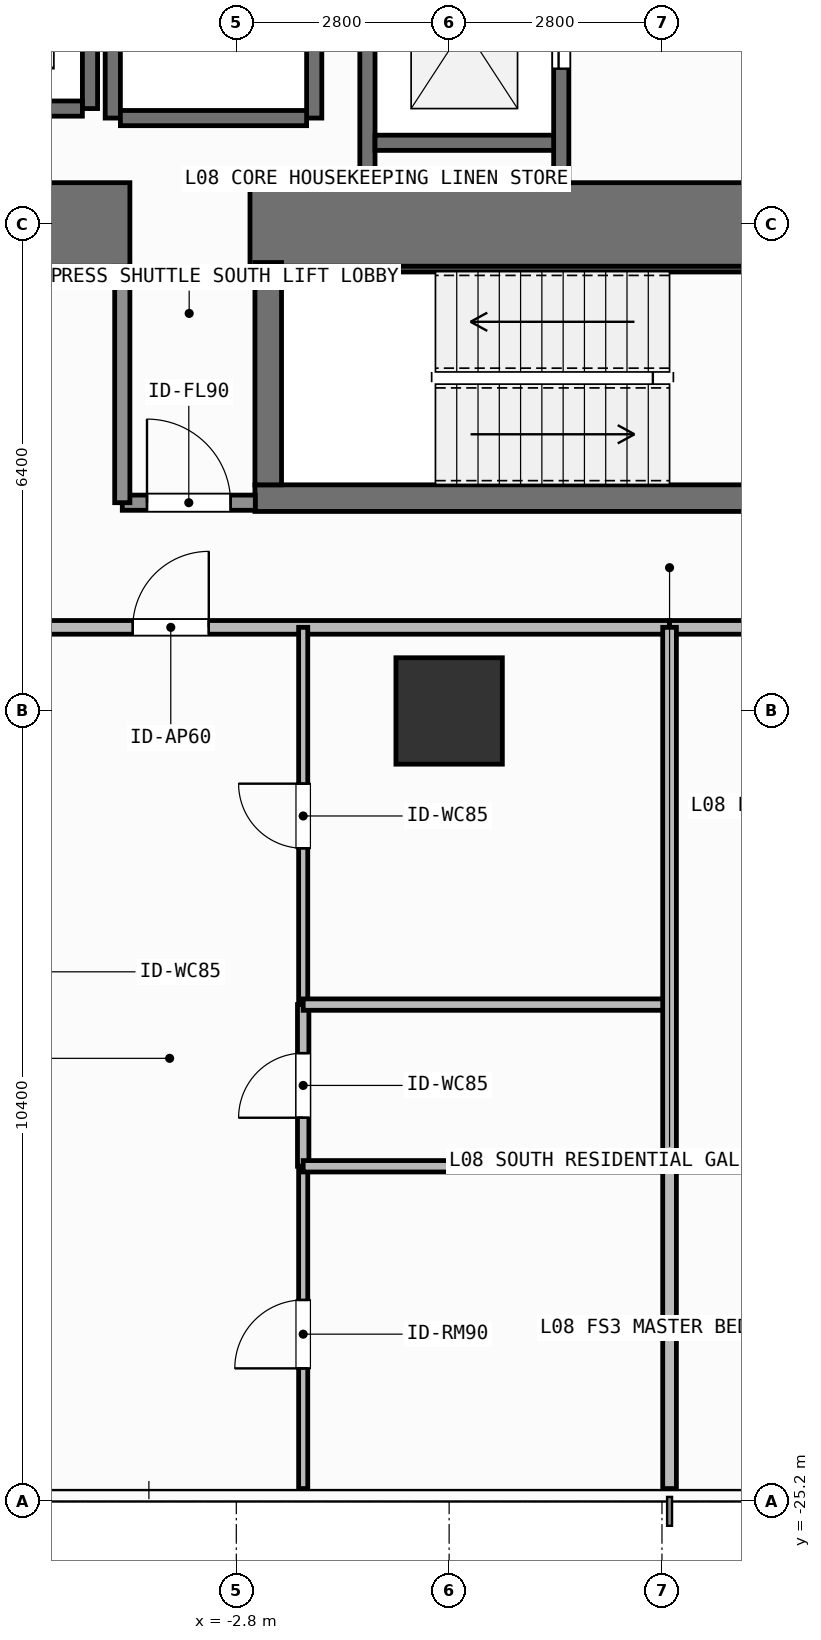
"""IFC4 building model, lengths in metres.
Left out: names, types, materials, properties, quantities, classifications, styles, units other than length and angle.
Written with IfcOpenShell. Run it as: python <this file> out.ifc"""

import sys

from ifc_helpers import new_model, si_unit, direction, frame, frame_2d, origin, origin_2d, place, context, subcontext, project, spatial, rectangle, extrude, element, fill, save


model = new_model("IFC4")
c1 = context("Model", 3, precision=1e-05, world=origin(), true_north=direction((0.0, 1.0)))
c2 = subcontext(c1, "Body", "Model", "MODEL_VIEW")
j1 = project(units=[si_unit("LENGTHUNIT", "METRE"), si_unit("PLANEANGLEUNIT", "RADIAN")], contexts=[c1])
p1 = place(None, origin())
s1 = spatial("IfcSite", under=j1, at=p1, CompositionType="ELEMENT")
p2 = place(p1, origin())
s2 = spatial("IfcBuilding", under=s1, at=p2, CompositionType="ELEMENT")
p3 = place(p2, frame((0.0, 0.0, 30.6)))
s3 = spatial("IfcBuildingStorey", under=s2, at=p3, CompositionType="ELEMENT", Elevation=30.6)
p4 = place(p3, frame((-7.55, -8.4, 0.0), z_axis=(0.0, 0.0, 1.0), x_axis=(1.0, 0.0, 0.0)))
e1 = element("IfcWall", 1, at=p4, inside=s3, PredefinedType="SHEAR", context=c2, shape_type="SweptSolid", body=[
    extrude(rectangle(XDim=3.35, YDim=1.1, at=frame_2d((1.675, 0.0))), origin(), (0.0, 0.0, 1.0), 3.9),
])
p5 = place(p3, frame((-2.62, -8.4, 0.0), z_axis=(0.0, 0.0, 1.0), x_axis=(1.0, 0.0, 0.0)))
e2 = element("IfcWall", 2, at=p5, inside=s3, PredefinedType="SHEAR", context=c2, shape_type="SweptSolid", body=[
    extrude(rectangle(XDim=7.27, YDim=1.1, at=frame_2d((3.635, 0.0))), origin(), (0.0, 0.0, 1.0), 3.9),
])
p6 = place(p3, frame((-2.555, -12.0, 0.0), z_axis=(0.0, 0.0, 1.0), x_axis=(1.0, 0.0, 0.0)))
e3 = element("IfcWall", 3, at=p6, inside=s3, PredefinedType="SHEAR", context=c2, shape_type="SweptSolid", body=[
    extrude(rectangle(XDim=7.31, YDim=0.35, at=frame_2d((3.655, 0.0))), origin(), (0.0, 0.0, 1.0), 3.9),
])
p7 = place(p3, frame((-2.2, -8.988, 0.0), z_axis=(0.0, 0.0, 1.0), x_axis=(1.0, 0.0, 0.0)))
e4 = element("IfcWall", 4, at=p7, inside=s3, PredefinedType="SHEAR", context=c2, shape_type="SweptSolid", body=[
    extrude(rectangle(XDim=6.6, YDim=0.075, at=frame_2d((3.3, 0.0))), origin(), (0.0, 0.0, 1.0), 3.9),
])
p8 = place(p3, frame((-2.38, -11.825, 0.0), z_axis=(0.0, 0.0, 1.0), x_axis=(0.0, 1.0, 0.0)))
e5 = element("IfcWall", 5, at=p8, inside=s3, PredefinedType="SHEAR", context=c2, shape_type="SweptSolid", body=[
    extrude(rectangle(XDim=2.925, YDim=0.35, at=frame_2d((1.462, 0.0))), origin(), (0.0, 0.0, 1.0), 3.9),
])
p9 = place(p3, frame((0.0, -14.8, 0.0), z_axis=(0.0, 0.0, 1.0), x_axis=(1.0, 0.0, 0.0)))
e6 = element("IfcColumn", 6, at=p9, inside=s3, PredefinedType="COLUMN", context=c2, shape_type="SweptSolid", body=[
    extrude(rectangle(XDim=1.4, YDim=1.4, at=origin_2d()), origin(), (0.0, 0.0, 1.0), 3.9),
])
p10 = place(p3, frame((-4.725, -6.875, 0.0), z_axis=(0.0, 0.0, 1.0), x_axis=(0.0, 1.0, 0.0)))
e7 = element("IfcWall", 7, at=p10, inside=s3, PredefinedType="SHEAR", context=c2, shape_type="SweptSolid", body=[
    extrude(rectangle(XDim=2.55, YDim=0.2, at=frame_2d((1.275, 0.0))), origin(), (0.0, 0.0, 1.0), 3.68),
])
p11 = place(p3, frame((-7.175, -6.875, 0.0), z_axis=(0.0, 0.0, 1.0), x_axis=(1.0, 0.0, 0.0)))
e8 = element("IfcWall", 8, at=p11, inside=s3, PredefinedType="SHEAR", context=c2, shape_type="SweptSolid", body=[
    extrude(rectangle(XDim=2.35, YDim=0.2, at=frame_2d((1.175, 0.0))), origin(), (0.0, 0.0, 1.0), 3.68),
])
for number, where, z_axis, x_axis in (
    (9, (-4.425, -7.0, 0.0), (0.0, 0.0, 1.0), (0.0, 1.0, 0.0)),
    (10, (-1.775, -7.0, 0.0), (0.0, 0.0, 1.0), (0.0, 1.0, 0.0)),
):
    element("IfcWall", number, at=place(p3, frame(where, z_axis=z_axis, x_axis=x_axis)), inside=s3, PredefinedType="SHEAR", context=c2, shape_type="SweptSolid", body=[
        extrude(rectangle(XDim=2.8, YDim=0.2, at=frame_2d((1.4, 0.0))), origin(), (0.0, 0.0, 1.0), 3.68),
    ])
p12 = place(p3, frame((-4.325, -7.0, 0.0), z_axis=(0.0, 0.0, 1.0), x_axis=(1.0, 0.0, 0.0)))
e11 = element("IfcWall", 11, at=p12, inside=s3, PredefinedType="SHEAR", context=c2, shape_type="SweptSolid", body=[
    extrude(rectangle(XDim=2.45, YDim=0.2, at=frame_2d((1.225, 0.0))), origin(), (0.0, 0.0, 1.0), 3.68),
])
p13 = place(p3, frame((-1.075, -7.85, 0.0), z_axis=(0.0, 0.0, 1.0), x_axis=(0.0, 1.0, 0.0)))
e12 = element("IfcWall", 12, at=p13, inside=s3, PredefinedType="SHEAR", context=c2, shape_type="SweptSolid", body=[
    extrude(rectangle(XDim=3.575, YDim=0.2, at=frame_2d((1.788, 0.0))), origin(), (0.0, 0.0, 1.0), 3.68),
])
p14 = place(p3, frame((1.475, -7.85, 0.0), z_axis=(0.0, 0.0, 1.0), x_axis=(0.0, 1.0, 0.0)))
e13 = element("IfcWall", 13, at=p14, inside=s3, PredefinedType="SHEAR", context=c2, shape_type="SweptSolid", body=[
    extrude(rectangle(XDim=3.575, YDim=0.2, at=frame_2d((1.788, 0.0))), origin(), (0.0, 0.0, 1.0), 3.68),
])
p15 = place(p14, frame((1.5, 0.0, 0.0)))
e14 = element("IfcOpeningElement", 14, at=p15, cuts=e13, PredefinedType="OPENING", context=c2, shape_type="SweptSolid", body=[
    extrude(rectangle(XDim=1.1, YDim=2.2, at=frame_2d((0.55, 1.1))), frame((0.0, 0.11, 0.0), z_axis=(0.0, -1.0, 0.0), x_axis=(1.0, 0.0, 0.0)), (0.0, 0.0, 1.0), 0.22),
])
p16 = place(p3, frame((-0.975, -7.325, 0.0), z_axis=(0.0, 0.0, 1.0), x_axis=(1.0, 0.0, 0.0)))
e15 = element("IfcWall", 15, at=p16, inside=s3, PredefinedType="SHEAR", context=c2, shape_type="SweptSolid", body=[
    extrude(rectangle(XDim=2.35, YDim=0.2, at=frame_2d((1.175, 0.0))), origin(), (0.0, 0.0, 1.0), 3.68),
])
p17 = place(p3, frame((-4.3, -12.06, 0.0), z_axis=(0.0, 0.0, 1.0), x_axis=(1.0, 0.0, 0.0)))
e16 = element("IfcWall", 16, at=p17, inside=s3, PredefinedType="SOLIDWALL", context=c2, shape_type="SweptSolid", body=[
    extrude(rectangle(XDim=1.75, YDim=0.2, at=frame_2d((0.875, 0.0))), origin(), (0.0, 0.0, 1.0), 3.68),
])
p18 = place(p17, frame((0.325, 0.0, 0.0)))
e17 = element("IfcOpeningElement", 17, at=p18, cuts=e16, PredefinedType="OPENING", context=c2, shape_type="SweptSolid", body=[
    extrude(rectangle(XDim=1.1, YDim=2.15, at=frame_2d((0.55, 1.075))), frame((0.0, 0.11, 0.0), z_axis=(0.0, -1.0, 0.0), x_axis=(1.0, 0.0, 0.0)), (0.0, 0.0, 1.0), 0.22),
])
p19 = place(p3, frame((-9.151, -13.7, 0.0), z_axis=(0.0, 0.0, 1.0), x_axis=(1.0, 0.0, 0.0)))
e18 = element("IfcWall", 18, at=p19, inside=s3, PredefinedType="PARTITIONING", context=c2, shape_type="SweptSolid", body=[
    extrude(rectangle(XDim=12.051, YDim=0.18, at=frame_2d((6.025, 0.0))), origin(), (0.0, 0.0, 1.0), 3.68),
])
p20 = place(p19, frame((4.989, 0.0, 0.0)))
e19 = element("IfcOpeningElement", 19, at=p20, cuts=e18, PredefinedType="OPENING", context=c2, shape_type="SweptSolid", body=[
    extrude(rectangle(XDim=1.0, YDim=2.2, at=frame_2d((0.5, 1.1))), frame((0.0, 0.1, 0.0), z_axis=(0.0, -1.0, 0.0), x_axis=(1.0, 0.0, 0.0)), (0.0, 0.0, 1.0), 0.2),
])
p21 = place(p3, frame((-1.92, -20.79, 0.0), z_axis=(0.0, 0.0, 1.0), x_axis=(0.0, 1.0, 0.0)))
e20 = element("IfcWall", 20, at=p21, inside=s3, PredefinedType="PARTITIONING", context=c2, shape_type="SweptSolid", body=[
    extrude(rectangle(XDim=2.127, YDim=0.15, at=frame_2d((1.063, 0.0))), origin(), (0.0, 0.0, 1.0), 3.68),
])
p22 = place(p21, frame((0.638, 0.0, 0.0)))
e21 = element("IfcOpeningElement", 21, at=p22, cuts=e20, PredefinedType="OPENING", context=c2, shape_type="SweptSolid", body=[
    extrude(rectangle(XDim=0.85, YDim=2.1, at=frame_2d((0.425, 1.05))), frame((0.0, 0.085, 0.0), z_axis=(0.0, -1.0, 0.0), x_axis=(1.0, 0.0, 0.0)), (0.0, 0.0, 1.0), 0.17),
])
p23 = place(p3, frame((-1.92, -18.663, 0.0), z_axis=(0.0, 0.0, 1.0), x_axis=(0.0, 1.0, 0.0)))
e22 = element("IfcWall", 22, at=p23, inside=s3, PredefinedType="PARTITIONING", context=c2, shape_type="SweptSolid", body=[
    extrude(rectangle(XDim=4.963, YDim=0.12, at=frame_2d((2.481, 0.0))), origin(), (0.0, 0.0, 1.0), 3.68),
])
p24 = place(p23, frame((2.056, 0.0, 0.0)))
e23 = element("IfcOpeningElement", 23, at=p24, cuts=e22, PredefinedType="OPENING", context=c2, shape_type="SweptSolid", body=[
    extrude(rectangle(XDim=0.85, YDim=2.1, at=frame_2d((0.425, 1.05))), frame((0.0, 0.07, 0.0), z_axis=(0.0, -1.0, 0.0), x_axis=(1.0, 0.0, 0.0)), (0.0, 0.0, 1.0), 0.14),
])
p25 = place(p3, frame((-1.92, -25.03, 0.0), z_axis=(0.0, 0.0, 1.0), x_axis=(0.0, 1.0, 0.0)))
e24 = element("IfcWall", 24, at=p25, inside=s3, PredefinedType="PARTITIONING", context=c2, shape_type="SweptSolid", body=[
    extrude(rectangle(XDim=4.24, YDim=0.12, at=frame_2d((2.12, 0.0))), origin(), (0.0, 0.0, 1.0), 3.68),
])
p26 = place(p25, frame((1.581, 0.0, 0.0)))
e25 = element("IfcOpeningElement", 25, at=p26, cuts=e24, PredefinedType="OPENING", context=c2, shape_type="SweptSolid", body=[
    extrude(rectangle(XDim=0.9, YDim=2.1, at=frame_2d((0.45, 1.05))), frame((0.0, 0.07, 0.0), z_axis=(0.0, -1.0, 0.0), x_axis=(1.0, 0.0, 0.0)), (0.0, 0.0, 1.0), 0.14),
])
p27 = place(p3, frame((2.9, -13.7, 0.0), z_axis=(0.0, 0.0, 1.0), x_axis=(1.0, 0.0, 0.0)))
e26 = element("IfcWall", 26, at=p27, inside=s3, PredefinedType="PARTITIONING", context=c2, shape_type="SweptSolid", body=[
    extrude(rectangle(XDim=11.922, YDim=0.18, at=frame_2d((5.961, 0.0))), origin(), (0.0, 0.0, 1.0), 3.68),
])
p28 = place(p27, frame((5.371, 0.0, 0.0)))
e27 = element("IfcOpeningElement", 27, at=p28, cuts=e26, PredefinedType="OPENING", context=c2, shape_type="SweptSolid", body=[
    extrude(rectangle(XDim=1.0, YDim=2.2, at=frame_2d((0.5, 1.1))), frame((0.0, 0.1, 0.0), z_axis=(0.0, -1.0, 0.0), x_axis=(1.0, 0.0, 0.0)), (0.0, 0.0, 1.0), 0.2),
])
p29 = place(p3, frame((-4.3, -12.06, 0.0), z_axis=(0.0, 0.0, 1.0), x_axis=(0.0, 1.0, 0.0)))
e28 = element("IfcWall", 28, at=p29, inside=s3, PredefinedType="SOLIDWALL", context=c2, shape_type="SweptSolid", body=[
    extrude(rectangle(XDim=3.11, YDim=0.2, at=frame_2d((1.555, 0.0))), origin(), (0.0, 0.0, 1.0), 3.68),
])
for number, where, z_axis, x_axis in (
    (29, (-1.92, -18.663, 0.0), (0.0, 0.0, 1.0), (1.0, 0.0, 0.0)),
    (30, (-1.92, -20.79, 0.0), (0.0, 0.0, 1.0), (1.0, 0.0, 0.0)),
):
    element("IfcWall", number, at=place(p3, frame(where, z_axis=z_axis, x_axis=x_axis)), inside=s3, PredefinedType="PARTITIONING", context=c2, shape_type="SweptSolid", body=[
        extrude(rectangle(XDim=4.82, YDim=0.15, at=frame_2d((2.41, 0.0))), origin(), (0.0, 0.0, 1.0), 3.68),
    ])
p30 = place(p3, frame((2.9, -20.79, 0.0), z_axis=(0.0, 0.0, 1.0), x_axis=(1.0, 0.0, 0.0)))
e31 = element("IfcWall", 31, at=p30, inside=s3, PredefinedType="PARTITIONING", context=c2, shape_type="SweptSolid", body=[
    extrude(rectangle(XDim=2.85, YDim=0.15, at=frame_2d((1.425, 0.0))), origin(), (0.0, 0.0, 1.0), 3.68),
])
p31 = place(p3, frame((2.9, -25.03, 0.0), z_axis=(0.0, 0.0, 1.0), x_axis=(0.0, 1.0, 0.0)))
e32 = element("IfcWall", 32, at=p31, inside=s3, PredefinedType="PARTITIONING", context=c2, shape_type="SweptSolid", body=[
    extrude(rectangle(XDim=11.33, YDim=0.18, at=frame_2d((5.665, 0.0))), origin(), (0.0, 0.0, 1.0), 3.68),
])
p32 = place(p15, origin())
e33 = element("IfcDoor", 33, at=p32, inside=s3, OperationType="SLIDING_TO_LEFT", PredefinedType="DOOR", context=c2, shape_type="SweptSolid", body=[
    extrude(rectangle(XDim=1.1, YDim=2.2, at=frame_2d((0.55, 1.1))), frame((0.0, 0.025, 0.0), z_axis=(0.0, -1.0, 0.0), x_axis=(1.0, 0.0, 0.0)), (0.0, 0.0, 1.0), 0.05),
])
fill(e14, e33)
p33 = place(p18, origin())
e34 = element("IfcDoor", 34, at=p33, inside=s3, OperationType="SINGLE_SWING_LEFT", PredefinedType="DOOR", context=c2, shape_type="SweptSolid", body=[
    extrude(rectangle(XDim=1.1, YDim=2.15, at=frame_2d((0.55, 1.075))), frame((0.0, 0.025, 0.0), z_axis=(0.0, -1.0, 0.0), x_axis=(1.0, 0.0, 0.0)), (0.0, 0.0, 1.0), 0.05),
])
fill(e17, e34)
p34 = place(p20, origin())
e35 = element("IfcDoor", 35, at=p34, inside=s3, OperationType="SINGLE_SWING_RIGHT", PredefinedType="DOOR", context=c2, shape_type="SweptSolid", body=[
    extrude(rectangle(XDim=1.0, YDim=2.2, at=frame_2d((0.5, 1.1))), frame((0.0, 0.025, 0.0), z_axis=(0.0, -1.0, 0.0), x_axis=(1.0, 0.0, 0.0)), (0.0, 0.0, 1.0), 0.05),
])
fill(e19, e35)
p35 = place(p22, origin())
e36 = element("IfcDoor", 36, at=p35, inside=s3, OperationType="SINGLE_SWING_LEFT", PredefinedType="DOOR", context=c2, shape_type="SweptSolid", body=[
    extrude(rectangle(XDim=0.85, YDim=2.1, at=frame_2d((0.425, 1.05))), frame((0.0, 0.025, 0.0), z_axis=(0.0, -1.0, 0.0), x_axis=(1.0, 0.0, 0.0)), (0.0, 0.0, 1.0), 0.05),
])
fill(e21, e36)
p36 = place(p24, origin())
e37 = element("IfcDoor", 37, at=p36, inside=s3, OperationType="SINGLE_SWING_RIGHT", PredefinedType="DOOR", context=c2, shape_type="SweptSolid", body=[
    extrude(rectangle(XDim=0.85, YDim=2.1, at=frame_2d((0.425, 1.05))), frame((0.0, 0.025, 0.0), z_axis=(0.0, -1.0, 0.0), x_axis=(1.0, 0.0, 0.0)), (0.0, 0.0, 1.0), 0.05),
])
fill(e23, e37)
p37 = place(p26, origin())
e38 = element("IfcDoor", 38, at=p37, inside=s3, OperationType="SINGLE_SWING_LEFT", PredefinedType="DOOR", context=c2, shape_type="SweptSolid", body=[
    extrude(rectangle(XDim=0.9, YDim=2.1, at=frame_2d((0.45, 1.05))), frame((0.0, 0.025, 0.0), z_axis=(0.0, -1.0, 0.0), x_axis=(1.0, 0.0, 0.0)), (0.0, 0.0, 1.0), 0.05),
])
fill(e25, e38)
save(model, sys.argv[1])
